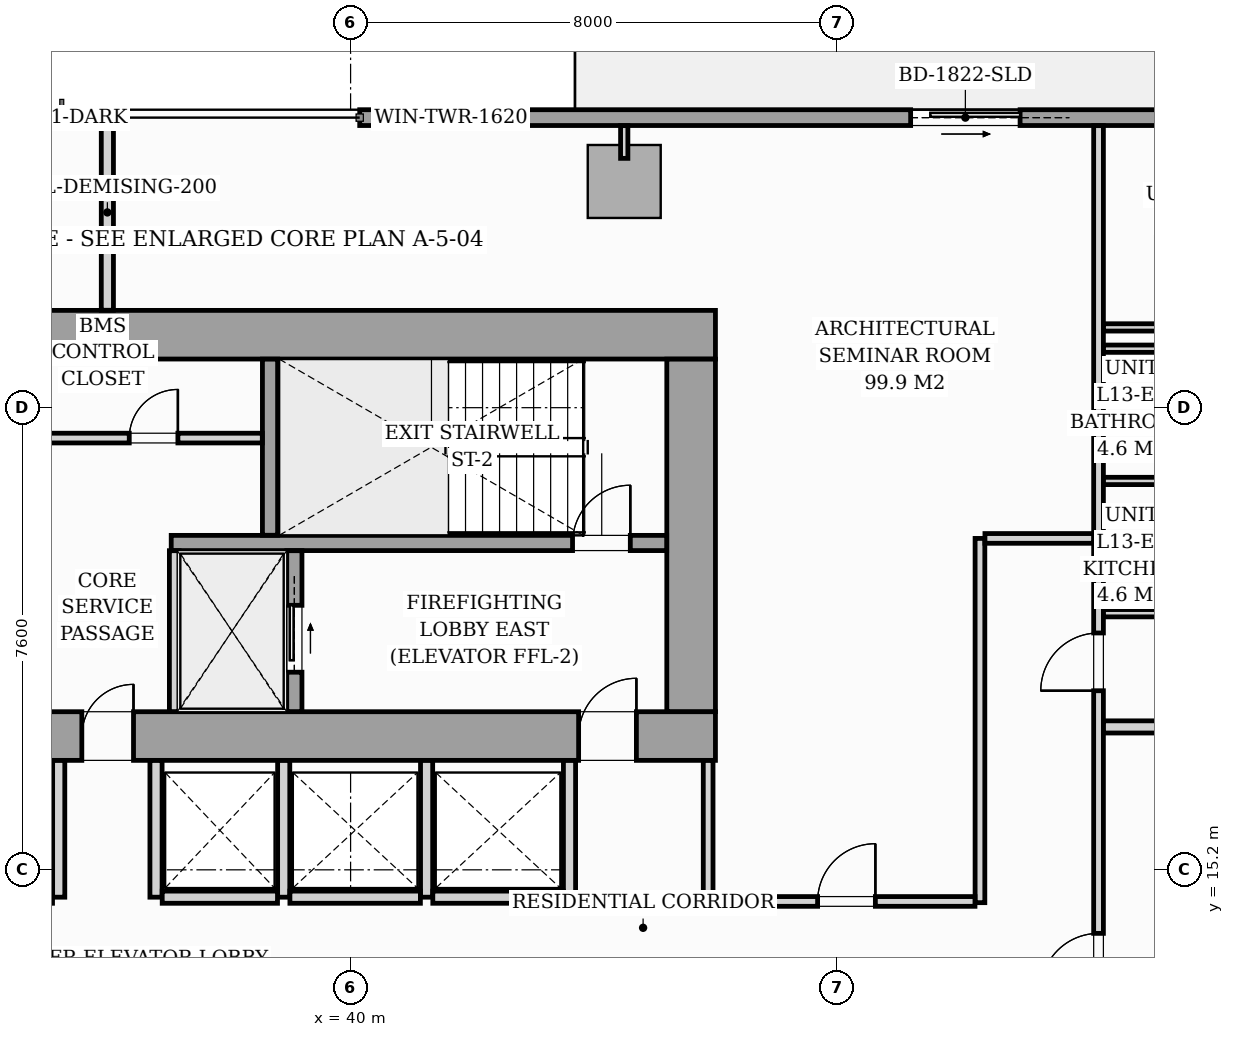
"""IFC4 building model, lengths in metres.
Left out: names, types, materials, properties, quantities, classifications, styles, units other than length and angle.
Written with IfcOpenShell. Run it as: python <this file> out.ifc"""

import sys

from ifc_helpers import new_model, si_unit, direction, frame, frame_2d, origin, origin_2d, place, context, subcontext, project, spatial, rectangle, i_section, extrude, source, transform, mapped, element, fill, save


model = new_model("IFC4")
c1 = context("Model", 3, precision=1e-05, world=origin(), true_north=direction((0.0, 1.0)))
c2 = subcontext(c1, "Body", "Model", "MODEL_VIEW")
j1 = project(units=[si_unit("LENGTHUNIT", "METRE"), si_unit("PLANEANGLEUNIT", "RADIAN")], contexts=[c1])
p1 = place(None, origin())
s1 = spatial("IfcSite", under=j1, at=p1, CompositionType="ELEMENT")
p2 = place(p1, origin())
s2 = spatial("IfcBuilding", under=s1, at=p2, CompositionType="ELEMENT")
p3 = place(p2, frame((0.0, 0.0, 48.6)))
s3 = spatial("IfcBuildingStorey", under=s2, at=p3, CompositionType="ELEMENT", Elevation=48.6)
m1 = source(origin(), c2, "Body", "SweptSolid", [
    extrude(i_section(OverallWidth=0.437, OverallDepth=0.514, WebThickness=0.061, FlangeThickness=0.097, FilletRadius=0.018, at=origin_2d()), origin(), (0.0, 0.0, 1.0), 3.196),
])
for number, where, z_axis, x_axis in (
    (1, (38.88, 17.4, 0.002), (0.0, 0.0, 1.0), (1.0, 0.0, 0.0)),
    (2, (45.6, 17.4, 0.002), (0.0, 0.0, 1.0), (1.0, 0.0, 0.0)),
    (3, (38.88, 24.0, 0.002), (0.0, 0.0, 1.0), (1.0, 0.0, 0.0)),
    (4, (45.6, 24.0, 0.002), (0.0, 0.0, 1.0), (1.0, 0.0, 0.0)),
):
    element("IfcColumn", number, at=place(p3, frame(where, z_axis=z_axis, x_axis=x_axis)), inside=s3, PredefinedType="PILASTER", context=c2, shape_type="MappedRepresentation", body=[
        mapped(m1, transform((0.0, 0.0, 0.0), scale=1.0)),
    ])
m2 = source(origin(), c2, "Body", "SweptSolid", [
    extrude(rectangle(XDim=1.2, YDim=1.2, at=origin_2d()), origin(), (0.0, 0.0, 1.0), 3.196),
])
p4 = place(p3, frame((44.5, 26.52, 0.002), z_axis=(0.0, 0.0, 1.0), x_axis=(1.0, 0.0, 0.0)))
e5 = element("IfcColumn", 5, at=p4, inside=s3, PredefinedType="COLUMN", context=c2, shape_type="MappedRepresentation", body=[
    mapped(m2, transform((0.0, 0.0, 0.0), scale=1.0)),
])
p5 = place(p3, frame((40.15, 27.57, 0.0), z_axis=(0.0, 0.0, 1.0), x_axis=(1.0, 0.0, 0.0)))
e6 = element("IfcWall", 6, at=p5, inside=s3, PredefinedType="STANDARD", context=c2, shape_type="SweptSolid", body=[
    extrude(rectangle(XDim=17.15, YDim=0.26, at=frame_2d((8.575, 0.0))), origin(), (0.0, 0.0, 1.0), 2.94),
])
p6 = place(p5, frame((9.06, 0.0, 0.0)))
e7 = element("IfcOpeningElement", 7, at=p6, cuts=e6, PredefinedType="OPENING", context=c2, shape_type="SweptSolid", body=[
    extrude(rectangle(XDim=1.8, YDim=2.06, at=frame_2d((0.9, 1.03))), frame((0.0, 0.14, 0.0), z_axis=(0.0, -1.0, 0.0), x_axis=(1.0, 0.0, 0.0)), (0.0, 0.0, 1.0), 0.28),
])
p7 = place(p5, frame((0.7, 0.0, 0.65)))
e8 = element("IfcOpeningElement", 8, at=p7, cuts=e6, PredefinedType="OPENING", context=c2, shape_type="SweptSolid", body=[
    extrude(rectangle(XDim=1.6, YDim=1.5, at=frame_2d((0.8, 0.75))), frame((0.0, 0.14, 0.0), z_axis=(0.0, -1.0, 0.0), x_axis=(1.0, 0.0, 0.0)), (0.0, 0.0, 1.0), 0.28),
])
p8 = place(p3, frame((26.0, 17.4, 0.0), z_axis=(0.0, 0.0, 1.0), x_axis=(1.0, 0.0, 0.0)))
e9 = element("IfcWall", 9, at=p8, inside=s3, PredefinedType="SHEAR", context=c2, shape_type="SweptSolid", body=[
    extrude(rectangle(XDim=20.0, YDim=0.8, at=frame_2d((10.0, 0.0))), origin(), (0.0, 0.0, 1.0), 3.2),
])
p9 = place(p8, frame((1.15, 0.0, 0.0)))
e10 = element("IfcOpeningElement", 10, at=p9, cuts=e9, PredefinedType="OPENING", context=c2, shape_type="SweptSolid", body=[
    extrude(rectangle(XDim=0.95, YDim=2.06, at=frame_2d((0.475, 1.03))), frame((0.0, 0.41, 0.0), z_axis=(0.0, -1.0, 0.0), x_axis=(1.0, 0.0, 0.0)), (0.0, 0.0, 1.0), 0.82),
])
p10 = place(p8, frame((9.58, 0.0, 0.0)))
e11 = element("IfcOpeningElement", 11, at=p10, cuts=e9, PredefinedType="OPENING", context=c2, shape_type="SweptSolid", body=[
    extrude(rectangle(XDim=0.85, YDim=2.0, at=frame_2d((0.425, 1.0))), frame((0.0, 0.41, 0.0), z_axis=(0.0, -1.0, 0.0), x_axis=(1.0, 0.0, 0.0)), (0.0, 0.0, 1.0), 0.82),
])
p11 = place(p8, frame((17.75, 0.0, 0.0)))
e12 = element("IfcOpeningElement", 12, at=p11, cuts=e9, PredefinedType="OPENING", context=c2, shape_type="SweptSolid", body=[
    extrude(rectangle(XDim=0.95, YDim=2.06, at=frame_2d((0.475, 1.03))), frame((0.0, 0.41, 0.0), z_axis=(0.0, -1.0, 0.0), x_axis=(1.0, 0.0, 0.0)), (0.0, 0.0, 1.0), 0.82),
])
p12 = place(p3, frame((26.0, 24.0, 0.0), z_axis=(0.0, 0.0, 1.0), x_axis=(1.0, 0.0, 0.0)))
e13 = element("IfcWall", 13, at=p12, inside=s3, PredefinedType="SHEAR", context=c2, shape_type="SweptSolid", body=[
    extrude(rectangle(XDim=20.0, YDim=0.8, at=frame_2d((10.0, 0.0))), origin(), (0.0, 0.0, 1.0), 3.2),
])
p13 = place(p3, frame((45.6, 17.802, 0.0), z_axis=(0.0, 0.0, 1.0), x_axis=(0.0, 1.0, 0.0)))
e14 = element("IfcWall", 14, at=p13, inside=s3, PredefinedType="SHEAR", context=c2, shape_type="SweptSolid", body=[
    extrude(rectangle(XDim=5.796, YDim=0.8, at=frame_2d((2.898, 0.0))), origin(), (0.0, 0.0, 1.0), 3.2),
])
p14 = place(p3, frame((37.05, 20.575, 0.0), z_axis=(0.0, 0.0, 1.0), x_axis=(1.0, 0.0, 0.0)))
e15 = element("IfcWall", 15, at=p14, inside=s3, PredefinedType="SOLIDWALL", context=c2, shape_type="SweptSolid", body=[
    extrude(rectangle(XDim=8.148, YDim=0.25, at=frame_2d((4.074, 0.0))), origin(), (0.0, 0.0, 1.0), 3.2),
])
p15 = place(p14, frame((6.6, 0.0, 0.0)))
e16 = element("IfcOpeningElement", 16, at=p15, cuts=e15, PredefinedType="OPENING", context=c2, shape_type="SweptSolid", body=[
    extrude(rectangle(XDim=0.95, YDim=2.06, at=frame_2d((0.475, 1.03))), frame((0.0, 0.135, 0.0), z_axis=(0.0, -1.0, 0.0), x_axis=(1.0, 0.0, 0.0)), (0.0, 0.0, 1.0), 0.27),
])
p16 = place(p3, frame((38.675, 20.702, 0.0), z_axis=(0.0, 0.0, 1.0), x_axis=(0.0, 1.0, 0.0)))
e17 = element("IfcWall", 17, at=p16, inside=s3, PredefinedType="SOLIDWALL", context=c2, shape_type="SweptSolid", body=[
    extrude(rectangle(XDim=2.896, YDim=0.25, at=frame_2d((1.448, 0.0))), origin(), (0.0, 0.0, 1.0), 3.2),
])
p17 = place(p3, frame((37.1, 17.802, 0.0), z_axis=(0.0, 0.0, 1.0), x_axis=(0.0, 1.0, 0.0)))
e18 = element("IfcWall", 18, at=p17, inside=s3, PredefinedType="PARTITIONING", context=c2, shape_type="SweptSolid", body=[
    extrude(rectangle(XDim=2.646, YDim=0.16, at=frame_2d((1.323, 0.0))), origin(), (0.0, 0.0, 1.0), 2.94),
])
p18 = place(p3, frame((39.075, 17.802, 0.0), z_axis=(0.0, 0.0, 1.0), x_axis=(0.0, 1.0, 0.0)))
e19 = element("IfcWall", 19, at=p18, inside=s3, PredefinedType="SOLIDWALL", context=c2, shape_type="SweptSolid", body=[
    extrude(rectangle(XDim=2.646, YDim=0.25, at=frame_2d((1.323, 0.0))), origin(), (0.0, 0.0, 1.0), 3.2),
])
p19 = place(p18, frame((0.648, 0.0, 0.0)))
e20 = element("IfcOpeningElement", 20, at=p19, cuts=e19, PredefinedType="OPENING", context=c2, shape_type="SweptSolid", body=[
    extrude(rectangle(XDim=1.1, YDim=2.08, at=frame_2d((0.55, 1.04))), frame((0.0, 0.135, 0.0), z_axis=(0.0, -1.0, 0.0), x_axis=(1.0, 0.0, 0.0)), (0.0, 0.0, 1.0), 0.27),
])
p20 = place(p3, frame((34.982, 22.3, 0.0), z_axis=(0.0, 0.0, 1.0), x_axis=(1.0, 0.0, 0.0)))
e21 = element("IfcWall", 21, at=p20, inside=s3, PredefinedType="PARTITIONING", context=c2, shape_type="SweptSolid", body=[
    extrude(rectangle(XDim=3.566, YDim=0.16, at=frame_2d((1.783, 0.0))), origin(), (0.0, 0.0, 1.0), 2.94),
])
p21 = place(p20, frame((1.378, 0.0, 0.0)))
e22 = element("IfcOpeningElement", 22, at=p21, cuts=e21, PredefinedType="OPENING", context=c2, shape_type="SweptSolid", body=[
    extrude(rectangle(XDim=0.8, YDim=2.05, at=frame_2d((0.4, 1.025))), frame((0.0, 0.09, 0.0), z_axis=(0.0, -1.0, 0.0), x_axis=(1.0, 0.0, 0.0)), (0.0, 0.0, 1.0), 0.18),
])
for number, where, z_axis, x_axis in (
    (23, (35.2, 14.75, 0.0), (0.0, 0.0, 1.0), (0.0, 1.0, 0.0)),
    (24, (36.8, 14.75, 0.0), (0.0, 0.0, 1.0), (0.0, 1.0, 0.0)),
    (25, (38.9, 14.75, 0.0), (0.0, 0.0, 1.0), (0.0, 1.0, 0.0)),
):
    element("IfcWall", number, at=place(p3, frame(where, z_axis=z_axis, x_axis=x_axis)), inside=s3, PredefinedType="PARTITIONING", context=c2, shape_type="SweptSolid", body=[
        extrude(rectangle(XDim=2.248, YDim=0.2, at=frame_2d((1.124, 0.0))), origin(), (0.0, 0.0, 1.0), 2.94),
    ])
p22 = place(p3, frame((36.902, 14.75, 0.0), z_axis=(0.0, 0.0, 1.0), x_axis=(1.0, 0.0, 0.0)))
e26 = element("IfcWall", 26, at=p22, inside=s3, PredefinedType="PARTITIONING", context=c2, shape_type="SweptSolid", body=[
    extrude(rectangle(XDim=1.896, YDim=0.2, at=frame_2d((0.948, 0.0))), origin(), (0.0, 0.0, 1.0), 2.94),
])
for number, where, z_axis, x_axis in (
    (27, (41.25, 14.75, 0.0), (0.0, 0.0, 1.0), (0.0, 1.0, 0.0)),
    (28, (43.6, 14.75, 0.0), (0.0, 0.0, 1.0), (0.0, 1.0, 0.0)),
):
    element("IfcWall", number, at=place(p3, frame(where, z_axis=z_axis, x_axis=x_axis)), inside=s3, PredefinedType="PARTITIONING", context=c2, shape_type="SweptSolid", body=[
        extrude(rectangle(XDim=2.248, YDim=0.2, at=frame_2d((1.124, 0.0))), origin(), (0.0, 0.0, 1.0), 2.94),
    ])
for number, where, z_axis, x_axis in (
    (29, (39.002, 14.75, 0.0), (0.0, 0.0, 1.0), (1.0, 0.0, 0.0)),
    (30, (41.352, 14.75, 0.0), (0.0, 0.0, 1.0), (1.0, 0.0, 0.0)),
):
    element("IfcWall", number, at=place(p3, frame(where, z_axis=z_axis, x_axis=x_axis)), inside=s3, PredefinedType="PARTITIONING", context=c2, shape_type="SweptSolid", body=[
        extrude(rectangle(XDim=2.146, YDim=0.2, at=frame_2d((1.073, 0.0))), origin(), (0.0, 0.0, 1.0), 2.94),
    ])
p23 = place(p3, frame((52.3, 12.712, 0.0), z_axis=(0.0, 0.0, 1.0), x_axis=(0.0, 1.0, 0.0)))
e31 = element("IfcWall", 31, at=p23, inside=s3, PredefinedType="PARTITIONING", context=c2, shape_type="SweptSolid", body=[
    extrude(rectangle(XDim=14.726, YDim=0.16, at=frame_2d((7.363, 0.0))), origin(), (0.0, 0.0, 1.0), 2.94),
])
p24 = place(p23, frame((0.493, 0.0, 0.0)))
e32 = element("IfcOpeningElement", 32, at=p24, cuts=e31, PredefinedType="OPENING", context=c2, shape_type="SweptSolid", body=[
    extrude(rectangle(XDim=0.95, YDim=2.06, at=frame_2d((0.475, 1.03))), frame((0.0, 0.09, 0.0), z_axis=(0.0, -1.0, 0.0), x_axis=(1.0, 0.0, 0.0)), (0.0, 0.0, 1.0), 0.18),
])
p25 = place(p23, frame((5.433, 0.0, 0.0)))
e33 = element("IfcOpeningElement", 33, at=p25, cuts=e31, PredefinedType="OPENING", context=c2, shape_type="SweptSolid", body=[
    extrude(rectangle(XDim=0.95, YDim=2.06, at=frame_2d((0.475, 1.03))), frame((0.0, 0.09, 0.0), z_axis=(0.0, -1.0, 0.0), x_axis=(1.0, 0.0, 0.0)), (0.0, 0.0, 1.0), 0.18),
])
p26 = place(p3, frame((36.0, 24.402, 0.0), z_axis=(0.0, 0.0, 1.0), x_axis=(0.0, 1.0, 0.0)))
e34 = element("IfcWall", 34, at=p26, inside=s3, PredefinedType="PARTITIONING", context=c2, shape_type="SweptSolid", body=[
    extrude(rectangle(XDim=3.218, YDim=0.2, at=frame_2d((1.609, 0.0))), origin(), (0.0, 0.0, 1.0), 2.94),
])
p27 = place(p3, frame((52.382, 17.55, 0.0), z_axis=(0.0, 0.0, 1.0), x_axis=(1.0, 0.0, 0.0)))
e35 = element("IfcWall", 35, at=p27, inside=s3, PredefinedType="PARTITIONING", context=c2, shape_type="SweptSolid", body=[
    extrude(rectangle(XDim=7.338, YDim=0.2, at=frame_2d((3.669, 0.0))), origin(), (0.0, 0.0, 1.0), 2.94),
])
for number, where, z_axis, x_axis in (
    (36, (52.382, 21.595, 0.0), (0.0, 0.0, 1.0), (1.0, 0.0, 0.0)),
    (37, (52.382, 19.42, 0.0), (0.0, 0.0, 1.0), (1.0, 0.0, 0.0)),
    (38, (52.382, 23.77, 0.0), (0.0, 0.0, 1.0), (1.0, 0.0, 0.0)),
):
    element("IfcWall", number, at=place(p3, frame(where, z_axis=z_axis, x_axis=x_axis)), inside=s3, PredefinedType="PARTITIONING", context=c2, shape_type="SweptSolid", body=[
        extrude(rectangle(XDim=2.256, YDim=0.12, at=frame_2d((1.128, 0.0))), origin(), (0.0, 0.0, 1.0), 2.94),
    ])
p28 = place(p3, frame((52.382, 24.12, 0.0), z_axis=(0.0, 0.0, 1.0), x_axis=(1.0, 0.0, 0.0)))
e39 = element("IfcWall", 39, at=p28, inside=s3, PredefinedType="PARTITIONING", context=c2, shape_type="SweptSolid", body=[
    extrude(rectangle(XDim=7.338, YDim=0.12, at=frame_2d((3.669, 0.0))), origin(), (0.0, 0.0, 1.0), 2.94),
])
p29 = place(p28, frame((3.253, 0.0, 0.0)))
e40 = element("IfcOpeningElement", 40, at=p29, cuts=e39, PredefinedType="OPENING", context=c2, shape_type="SweptSolid", body=[
    extrude(rectangle(XDim=0.85, YDim=2.05, at=frame_2d((0.425, 1.025))), frame((0.0, 0.07, 0.0), z_axis=(0.0, -1.0, 0.0), x_axis=(1.0, 0.0, 0.0)), (0.0, 0.0, 1.0), 0.14),
])
p30 = place(p3, frame((50.35, 14.66, 0.0), z_axis=(0.0, 0.0, 1.0), x_axis=(0.0, 1.0, 0.0)))
e41 = element("IfcWall", 41, at=p30, inside=s3, PredefinedType="PARTITIONING", context=c2, shape_type="SweptSolid", body=[
    extrude(rectangle(XDim=5.99, YDim=0.16, at=frame_2d((2.995, 0.0))), origin(), (0.0, 0.0, 1.0), 2.94),
])
p31 = place(p3, frame((50.432, 20.65, 0.0), z_axis=(0.0, 0.0, 1.0), x_axis=(1.0, 0.0, 0.0)))
e42 = element("IfcWall", 42, at=p31, inside=s3, PredefinedType="PARTITIONING", context=c2, shape_type="SweptSolid", body=[
    extrude(rectangle(XDim=1.786, YDim=0.16, at=frame_2d((0.893, 0.0))), origin(), (0.0, 0.0, 1.0), 2.94),
])
p32 = place(p3, frame((45.84, 14.68, 0.0), z_axis=(0.0, 0.0, 1.0), x_axis=(1.0, 0.0, 0.0)))
e43 = element("IfcWall", 43, at=p32, inside=s3, PredefinedType="PARTITIONING", context=c2, shape_type="SweptSolid", body=[
    extrude(rectangle(XDim=4.428, YDim=0.16, at=frame_2d((2.214, 0.0))), origin(), (0.0, 0.0, 1.0), 2.94),
])
p33 = place(p32, frame((1.84, 0.0, 0.0)))
e44 = element("IfcOpeningElement", 44, at=p33, cuts=e43, PredefinedType="OPENING", context=c2, shape_type="SweptSolid", body=[
    extrude(rectangle(XDim=0.95, YDim=2.06, at=frame_2d((0.475, 1.03))), frame((0.0, 0.09, 0.0), z_axis=(0.0, -1.0, 0.0), x_axis=(1.0, 0.0, 0.0)), (0.0, 0.0, 1.0), 0.18),
])
p34 = place(p3, frame((45.88, 14.762, 0.0), z_axis=(0.0, 0.0, 1.0), x_axis=(0.0, 1.0, 0.0)))
e45 = element("IfcWall", 45, at=p34, inside=s3, PredefinedType="PARTITIONING", context=c2, shape_type="SweptSolid", body=[
    extrude(rectangle(XDim=2.236, YDim=0.16, at=frame_2d((1.118, 0.0))), origin(), (0.0, 0.0, 1.0), 2.94),
])
p35 = place(p3, frame((44.5, 26.9, 0.0), z_axis=(0.0, 0.0, 1.0), x_axis=(0.0, 1.0, 0.0)))
e46 = element("IfcWall", 46, at=p35, inside=s3, PredefinedType="PARTITIONING", context=c2, shape_type="SweptSolid", body=[
    extrude(rectangle(XDim=0.538, YDim=0.12, at=frame_2d((0.269, 0.0))), origin(), (0.0, 0.0, 1.0), 2.94),
])
m3 = source(origin(), c2, "Body", "SweptSolid", [
    extrude(rectangle(XDim=1.8, YDim=2.06, at=frame_2d((0.9, 1.03))), frame((0.0, 0.025, 0.0), z_axis=(0.0, -1.0, 0.0), x_axis=(1.0, 0.0, 0.0)), (0.0, 0.0, 1.0), 0.05),
])
p36 = place(p6, origin())
e47 = element("IfcDoor", 47, at=p36, inside=s3, OperationType="SLIDING_TO_RIGHT", PredefinedType="DOOR", context=c2, shape_type="MappedRepresentation", body=[
    mapped(m3, transform((0.0, 0.0, 0.0), scale=1.0)),
])
fill(e7, e47)
m4 = source(origin(), c2, "Body", "SweptSolid", [
    extrude(rectangle(XDim=1.6, YDim=1.5, at=frame_2d((0.8, 0.75))), frame((0.0, 0.03, 0.0), z_axis=(0.0, -1.0, 0.0), x_axis=(1.0, 0.0, 0.0)), (0.0, 0.0, 1.0), 0.06),
])
p37 = place(p7, origin())
e48 = element("IfcWindow", 48, at=p37, inside=s3, PartitioningType="SINGLE_PANEL", PredefinedType="WINDOW", context=c2, shape_type="MappedRepresentation", body=[
    mapped(m4, transform((0.0, 0.0, 0.0), scale=1.0)),
])
fill(e8, e48)
m5 = source(origin(), c2, "Body", "SweptSolid", [
    extrude(rectangle(XDim=0.85, YDim=2.0, at=frame_2d((0.425, 1.0))), frame((0.0, 0.025, 0.0), z_axis=(0.0, -1.0, 0.0), x_axis=(1.0, 0.0, 0.0)), (0.0, 0.0, 1.0), 0.05),
])
p38 = place(p10, origin())
e49 = element("IfcDoor", 49, at=p38, inside=s3, OperationType="SINGLE_SWING_RIGHT", PredefinedType="DOOR", context=c2, shape_type="MappedRepresentation", body=[
    mapped(m5, transform((0.0, 0.0, 0.0), scale=1.0)),
])
fill(e11, e49)
m6 = source(origin(), c2, "Body", "SweptSolid", [
    extrude(rectangle(XDim=0.95, YDim=2.06, at=frame_2d((0.475, 1.03))), frame((0.0, 0.025, 0.0), z_axis=(0.0, -1.0, 0.0), x_axis=(1.0, 0.0, 0.0)), (0.0, 0.0, 1.0), 0.05),
])
p39 = place(p11, origin())
e50 = element("IfcDoor", 50, at=p39, inside=s3, OperationType="SINGLE_SWING_RIGHT", PredefinedType="DOOR", context=c2, shape_type="MappedRepresentation", body=[
    mapped(m6, transform((0.0, 0.0, 0.0), scale=1.0)),
])
fill(e12, e50)
p40 = place(p15, origin())
e51 = element("IfcDoor", 51, at=p40, inside=s3, OperationType="SINGLE_SWING_RIGHT", PredefinedType="DOOR", context=c2, shape_type="MappedRepresentation", body=[
    mapped(m6, transform((0.0, 0.0, 0.0), scale=1.0)),
])
fill(e16, e51)
m7 = source(origin(), c2, "Body", "SweptSolid", [
    extrude(rectangle(XDim=1.1, YDim=2.08, at=frame_2d((0.55, 1.04))), frame((0.0, 0.025, 0.0), z_axis=(0.0, -1.0, 0.0), x_axis=(1.0, 0.0, 0.0)), (0.0, 0.0, 1.0), 0.05),
])
p41 = place(p19, origin())
e52 = element("IfcDoor", 52, at=p41, inside=s3, OperationType="SLIDING_TO_RIGHT", PredefinedType="DOOR", context=c2, shape_type="MappedRepresentation", body=[
    mapped(m7, transform((0.0, 0.0, 0.0), scale=1.0)),
])
fill(e20, e52)
m8 = source(origin(), c2, "Body", "SweptSolid", [
    extrude(rectangle(XDim=0.8, YDim=2.05, at=frame_2d((0.4, 1.025))), frame((0.0, 0.025, 0.0), z_axis=(0.0, -1.0, 0.0), x_axis=(1.0, 0.0, 0.0)), (0.0, 0.0, 1.0), 0.05),
])
p42 = place(p21, origin())
e53 = element("IfcDoor", 53, at=p42, inside=s3, OperationType="SINGLE_SWING_RIGHT", PredefinedType="DOOR", context=c2, shape_type="MappedRepresentation", body=[
    mapped(m8, transform((0.0, 0.0, 0.0), scale=1.0)),
])
fill(e22, e53)
m9 = source(origin(), c2, "Body", "SweptSolid", [
    extrude(rectangle(XDim=0.95, YDim=2.06, at=frame_2d((0.475, 1.03))), frame((0.0, 0.025, 0.0), z_axis=(0.0, -1.0, 0.0), x_axis=(1.0, 0.0, 0.0)), (0.0, 0.0, 1.0), 0.05),
])
p43 = place(p24, origin())
e54 = element("IfcDoor", 54, at=p43, inside=s3, OperationType="SINGLE_SWING_LEFT", PredefinedType="DOOR", context=c2, shape_type="MappedRepresentation", body=[
    mapped(m9, transform((0.0, 0.0, 0.0), scale=1.0)),
])
fill(e32, e54)
p44 = place(p25, origin())
e55 = element("IfcDoor", 55, at=p44, inside=s3, OperationType="SINGLE_SWING_LEFT", PredefinedType="DOOR", context=c2, shape_type="MappedRepresentation", body=[
    mapped(m9, transform((0.0, 0.0, 0.0), scale=1.0)),
])
fill(e33, e55)
p45 = place(p33, origin())
e56 = element("IfcDoor", 56, at=p45, inside=s3, OperationType="SINGLE_SWING_RIGHT", PredefinedType="DOOR", context=c2, shape_type="MappedRepresentation", body=[
    mapped(m9, transform((0.0, 0.0, 0.0), scale=1.0)),
])
fill(e44, e56)
save(model, sys.argv[1])
